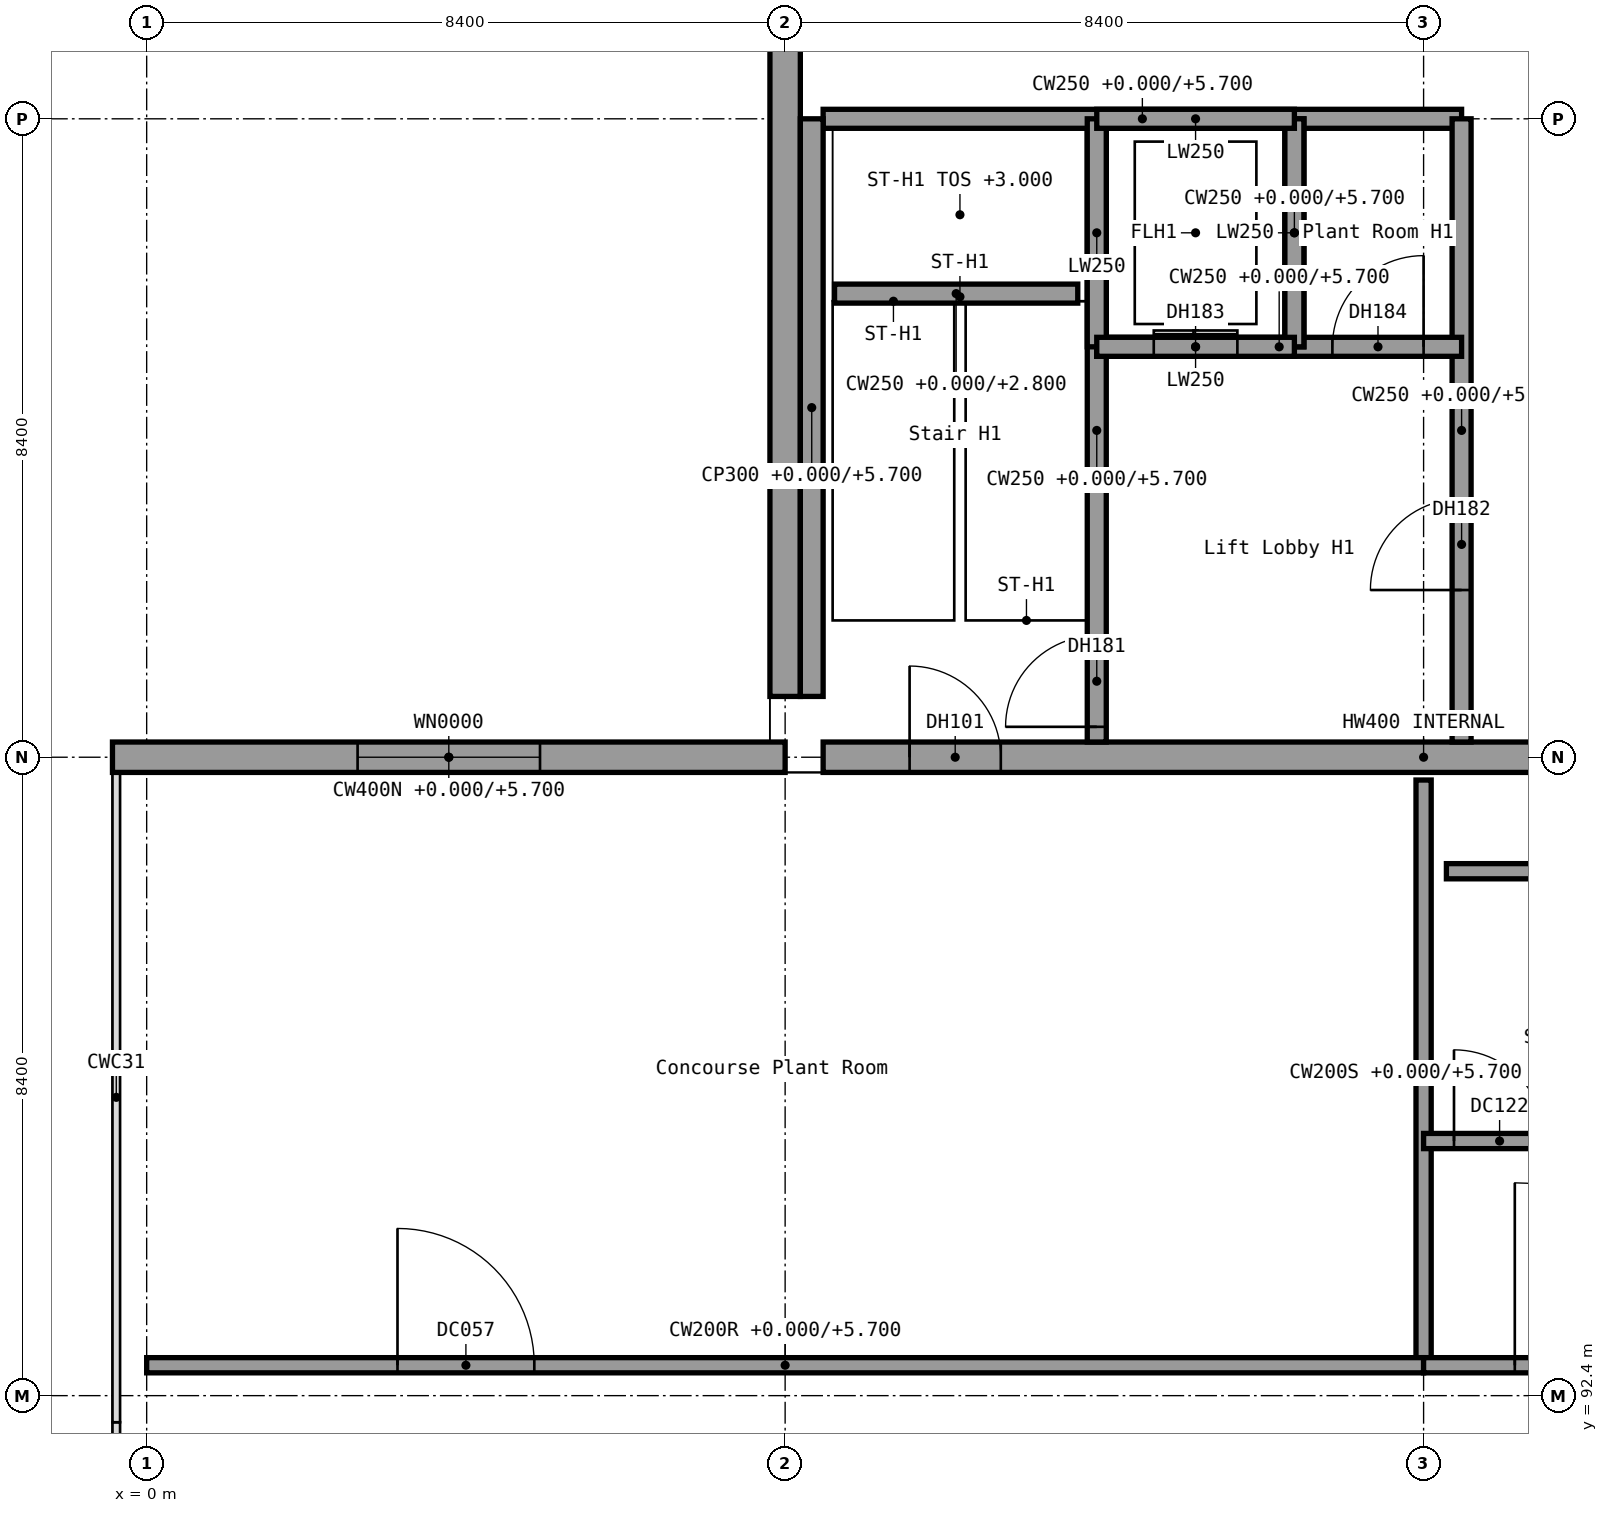
"""IFC4 building model, lengths in metres.
Left out: names, types, materials, properties, quantities, classifications, styles, units other than length and angle.
Written with IfcOpenShell. Run it as: python <this file> out.ifc"""

import sys

from ifc_helpers import new_model, si_unit, direction, frame, frame_2d, origin, origin_2d, place, context, subcontext, project, spatial, rectangle, extrude, element, fill, save


model = new_model("IFC4")
c1 = context("Model", 3, precision=1e-05, world=origin(), true_north=direction((0.0, 1.0)))
c2 = subcontext(c1, "Body", "Model", "MODEL_VIEW")
j1 = project(units=[si_unit("LENGTHUNIT", "METRE"), si_unit("PLANEANGLEUNIT", "RADIAN")], contexts=[c1])
p1 = place(None, origin())
s1 = spatial("IfcSite", under=j1, at=p1, CompositionType="ELEMENT")
p2 = place(p1, origin())
s2 = spatial("IfcBuilding", under=s1, at=p2, CompositionType="ELEMENT")
p3 = place(p2, origin())
s3 = spatial("IfcBuildingStorey", under=s2, at=p3, CompositionType="ELEMENT", Elevation=0.0)
p4 = place(p3, frame((8.4, 100.8, 0.0), z_axis=(0.0, 0.0, 1.0), x_axis=(1.0, 0.0, 0.0)))
e1 = element("IfcColumn", 1, at=p4, inside=s3, PredefinedType="COLUMN", context=c2, shape_type="SweptSolid", body=[
    extrude(rectangle(XDim=1.0, YDim=1.6, at=origin_2d()), origin(), (0.0, 0.0, 1.0), 6.0),
])
p5 = place(p3, frame((8.9, 100.8, 0.0), z_axis=(0.0, 0.0, 1.0), x_axis=(1.0, 0.0, 0.0)))
e2 = element("IfcWall", 2, at=p5, inside=s3, PredefinedType="STANDARD", context=c2, shape_type="SweptSolid", body=[
    extrude(rectangle(XDim=15.8, YDim=0.4, at=frame_2d((7.9, 0.0))), origin(), (0.0, 0.0, 1.0), 4.5),
])
p6 = place(p5, frame((1.137, 0.0, 0.0)))
e3 = element("IfcOpeningElement", 3, at=p6, cuts=e2, PredefinedType="OPENING", context=c2, shape_type="SweptSolid", body=[
    extrude(rectangle(XDim=1.2, YDim=2.1, at=frame_2d((0.6, 1.05))), frame((0.0, 0.2, 0.0), z_axis=(0.0, -1.0, 0.0), x_axis=(1.0, 0.0, 0.0)), (0.0, 0.0, 1.0), 0.4),
])
p7 = place(p3, frame((8.4, 101.6, 0.0), z_axis=(0.0, 0.0, 1.0), x_axis=(0.0, 1.0, 0.0)))
e4 = element("IfcWall", 4, at=p7, inside=s3, PredefinedType="SHEAR", context=c2, shape_type="SweptSolid", body=[
    extrude(rectangle(XDim=99.2, YDim=0.4, at=frame_2d((49.6, 0.0))), origin(), (0.0, 0.0, 1.0), 6.0),
])
p8 = place(p7, frame((18.3, 0.0, 1.0)))
e5 = element("IfcOpeningElement", 5, at=p8, cuts=e4, PredefinedType="OPENING", context=c2, shape_type="SweptSolid", body=[
    extrude(rectangle(XDim=4.2, YDim=2.4, at=frame_2d((2.1, 1.2))), frame((0.0, 0.2, 0.0), z_axis=(0.0, -1.0, 0.0), x_axis=(1.0, 0.0, 0.0)), (0.0, 0.0, 1.0), 0.4),
])
p9 = place(p7, frame((38.3, 0.0, 1.0)))
e6 = element("IfcOpeningElement", 6, at=p9, cuts=e4, PredefinedType="OPENING", context=c2, shape_type="SweptSolid", body=[
    extrude(rectangle(XDim=4.2, YDim=2.4, at=frame_2d((2.1, 1.2))), frame((0.0, 0.2, 0.0), z_axis=(0.0, -1.0, 0.0), x_axis=(1.0, 0.0, 0.0)), (0.0, 0.0, 1.0), 0.4),
])
p10 = place(p7, frame((56.3, 0.0, 1.0)))
e7 = element("IfcOpeningElement", 7, at=p10, cuts=e4, PredefinedType="OPENING", context=c2, shape_type="SweptSolid", body=[
    extrude(rectangle(XDim=4.2, YDim=2.4, at=frame_2d((2.1, 1.2))), frame((0.0, 0.2, 0.0), z_axis=(0.0, -1.0, 0.0), x_axis=(1.0, 0.0, 0.0)), (0.0, 0.0, 1.0), 0.4),
])
p11 = place(p7, frame((76.3, 0.0, 1.0)))
e8 = element("IfcOpeningElement", 8, at=p11, cuts=e4, PredefinedType="OPENING", context=c2, shape_type="SweptSolid", body=[
    extrude(rectangle(XDim=4.2, YDim=2.4, at=frame_2d((2.1, 1.2))), frame((0.0, 0.2, 0.0), z_axis=(0.0, -1.0, 0.0), x_axis=(1.0, 0.0, 0.0)), (0.0, 0.0, 1.0), 0.4),
])
p12 = place(p3, frame((12.5, 101.0, 0.0), z_axis=(0.0, 0.0, 1.0), x_axis=(0.0, 1.0, 0.0)))
e9 = element("IfcWall", 9, at=p12, inside=s3, PredefinedType="SHEAR", context=c2, shape_type="SweptSolid", body=[
    extrude(rectangle(XDim=8.2, YDim=0.25, at=frame_2d((4.1, 0.0))), origin(), (0.0, 0.0, 1.0), 5.7),
])
p13 = place(p12, frame((0.2, 0.0, 0.0)))
e10 = element("IfcOpeningElement", 10, at=p13, cuts=e9, PredefinedType="OPENING", context=c2, shape_type="SweptSolid", body=[
    extrude(rectangle(XDim=1.2, YDim=2.1, at=frame_2d((0.6, 1.05))), frame((0.0, 0.125, 0.0), z_axis=(0.0, -1.0, 0.0), x_axis=(1.0, 0.0, 0.0)), (0.0, 0.0, 1.0), 0.25),
])
p14 = place(p3, frame((8.9, 109.2, 0.0), z_axis=(0.0, 0.0, 1.0), x_axis=(1.0, 0.0, 0.0)))
e11 = element("IfcWall", 11, at=p14, inside=s3, PredefinedType="SHEAR", context=c2, shape_type="SweptSolid", body=[
    extrude(rectangle(XDim=8.4, YDim=0.25, at=frame_2d((4.2, 0.0))), origin(), (0.0, 0.0, 1.0), 5.7),
])
p15 = place(p3, frame((17.3, 101.0, 0.0), z_axis=(0.0, 0.0, 1.0), x_axis=(0.0, 1.0, 0.0)))
e12 = element("IfcWall", 12, at=p15, inside=s3, PredefinedType="SHEAR", context=c2, shape_type="SweptSolid", body=[
    extrude(rectangle(XDim=8.2, YDim=0.25, at=frame_2d((4.1, 0.0))), origin(), (0.0, 0.0, 1.0), 5.7),
])
p16 = place(p15, frame((2.0, 0.0, 0.0)))
e13 = element("IfcOpeningElement", 13, at=p16, cuts=e12, PredefinedType="OPENING", context=c2, shape_type="SweptSolid", body=[
    extrude(rectangle(XDim=1.2, YDim=2.1, at=frame_2d((0.6, 1.05))), frame((0.0, 0.125, 0.0), z_axis=(0.0, -1.0, 0.0), x_axis=(1.0, 0.0, 0.0)), (0.0, 0.0, 1.0), 0.25),
])
p17 = place(p3, frame((12.5, 106.2, 0.0), z_axis=(0.0, 0.0, 1.0), x_axis=(1.0, 0.0, 0.0)))
e14 = element("IfcWall", 14, at=p17, inside=s3, PredefinedType="SHEAR", context=c2, shape_type="SweptSolid", body=[
    extrude(rectangle(XDim=4.8, YDim=0.25, at=frame_2d((2.4, 0.0))), origin(), (0.0, 0.0, 1.0), 5.7),
])
p18 = place(p17, frame((0.75, 0.0, 0.0)))
e15 = element("IfcOpeningElement", 15, at=p18, cuts=e14, PredefinedType="OPENING", context=c2, shape_type="SweptSolid", body=[
    extrude(rectangle(XDim=1.1, YDim=2.1, at=frame_2d((0.55, 1.05))), frame((0.0, 0.125, 0.0), z_axis=(0.0, -1.0, 0.0), x_axis=(1.0, 0.0, 0.0)), (0.0, 0.0, 1.0), 0.25),
])
p19 = place(p17, frame((3.1, 0.0, 0.0)))
e16 = element("IfcOpeningElement", 16, at=p19, cuts=e14, PredefinedType="OPENING", context=c2, shape_type="SweptSolid", body=[
    extrude(rectangle(XDim=1.2, YDim=2.1, at=frame_2d((0.6, 1.05))), frame((0.0, 0.125, 0.0), z_axis=(0.0, -1.0, 0.0), x_axis=(1.0, 0.0, 0.0)), (0.0, 0.0, 1.0), 0.25),
])
p20 = place(p3, frame((15.1, 106.2, 0.0), z_axis=(0.0, 0.0, 1.0), x_axis=(0.0, 1.0, 0.0)))
e17 = element("IfcWall", 17, at=p20, inside=s3, PredefinedType="SHEAR", context=c2, shape_type="SweptSolid", body=[
    extrude(rectangle(XDim=3.0, YDim=0.25, at=frame_2d((1.5, 0.0))), origin(), (0.0, 0.0, 1.0), 5.7),
])
p21 = place(p3, frame((8.75, 101.6, 0.0), z_axis=(0.0, 0.0, 1.0), x_axis=(0.0, 1.0, 0.0)))
e18 = element("IfcWall", 18, at=p21, inside=s3, PredefinedType="SHEAR", context=c2, shape_type="SweptSolid", body=[
    extrude(rectangle(XDim=7.6, YDim=0.3, at=frame_2d((3.8, 0.0))), origin(), (0.0, 0.0, 1.0), 5.7),
])
p22 = place(p3, frame((9.05, 106.9, 0.0), z_axis=(0.0, 0.0, 1.0), x_axis=(1.0, 0.0, 0.0)))
e19 = element("IfcWall", 19, at=p22, inside=s3, PredefinedType="SHEAR", context=c2, shape_type="SweptSolid", body=[
    extrude(rectangle(XDim=3.2, YDim=0.25, at=frame_2d((1.6, 0.0))), origin(), (0.0, 0.0, 1.0), 2.8),
])
for number, where, z_axis, x_axis in (
    (20, (12.5, 106.2, -1.4), (0.0, 0.0, 1.0), (0.0, 1.0, 0.0)),
    (21, (15.1, 106.2, -1.4), (0.0, 0.0, 1.0), (0.0, 1.0, 0.0)),
):
    element("IfcWall", number, at=place(p3, frame(where, z_axis=z_axis, x_axis=x_axis)), inside=s3, PredefinedType="SHEAR", context=c2, shape_type="SweptSolid", body=[
        extrude(rectangle(XDim=3.0, YDim=0.25, at=frame_2d((1.5, 0.0))), origin(), (0.0, 0.0, 1.0), 1.4),
    ])
for number, where, z_axis, x_axis in (
    (22, (12.5, 106.2, -1.4), (0.0, 0.0, 1.0), (1.0, 0.0, 0.0)),
    (23, (12.5, 109.2, -1.4), (0.0, 0.0, 1.0), (1.0, 0.0, 0.0)),
):
    element("IfcWall", number, at=place(p3, frame(where, z_axis=z_axis, x_axis=x_axis)), inside=s3, PredefinedType="SHEAR", context=c2, shape_type="SweptSolid", body=[
        extrude(rectangle(XDim=2.6, YDim=0.25, at=frame_2d((1.3, 0.0))), origin(), (0.0, 0.0, 1.0), 1.4),
    ])
p23 = place(p3, frame((0.0, 92.4, 0.0), z_axis=(0.0, 0.0, 1.0), x_axis=(1.0, 0.0, 0.0)))
e24 = element("IfcColumn", 24, at=p23, inside=s3, PredefinedType="COLUMN", context=c2, shape_type="SweptSolid", body=[
    extrude(rectangle(XDim=0.7, YDim=0.7, at=origin_2d()), origin(), (0.0, 0.0, 1.0), 6.0),
])
for number, where, z_axis, x_axis in (
    (25, (8.4, 92.4, 0.0), (0.0, 0.0, 1.0), (1.0, 0.0, 0.0)),
    (26, (16.8, 92.4, 0.0), (0.0, 0.0, 1.0), (1.0, 0.0, 0.0)),
):
    element("IfcColumn", number, at=place(p3, frame(where, z_axis=z_axis, x_axis=x_axis)), inside=s3, PredefinedType="COLUMN", context=c2, shape_type="SweptSolid", body=[
        extrude(rectangle(XDim=0.6, YDim=0.6, at=origin_2d()), origin(), (0.0, 0.0, 1.0), 6.0),
    ])
p24 = place(p3, frame((0.0, 99.6, 0.0), z_axis=(0.0, 0.0, 1.0), x_axis=(1.0, 0.0, 0.0)))
e27 = element("IfcColumn", 27, at=p24, inside=s3, PredefinedType="COLUMN", context=c2, shape_type="SweptSolid", body=[
    extrude(rectangle(XDim=0.7, YDim=0.7, at=origin_2d()), origin(), (0.0, 0.0, 1.0), 6.0),
])
for number, where, z_axis, x_axis in (
    (28, (8.4, 99.6, 0.0), (0.0, 0.0, 1.0), (1.0, 0.0, 0.0)),
    (29, (16.8, 99.6, 0.0), (0.0, 0.0, 1.0), (1.0, 0.0, 0.0)),
):
    element("IfcColumn", number, at=place(p3, frame(where, z_axis=z_axis, x_axis=x_axis)), inside=s3, PredefinedType="COLUMN", context=c2, shape_type="SweptSolid", body=[
        extrude(rectangle(XDim=0.6, YDim=0.6, at=origin_2d()), origin(), (0.0, 0.0, 1.0), 6.0),
    ])
p25 = place(p3, frame((16.8, 100.5, 0.0), z_axis=(0.0, 0.0, 1.0), x_axis=(0.0, -1.0, 0.0)))
e30 = element("IfcWall", 30, at=p25, inside=s3, PredefinedType="SOLIDWALL", context=c2, shape_type="SweptSolid", body=[
    extrude(rectangle(XDim=7.7, YDim=0.2, at=frame_2d((3.85, 0.0))), origin(), (0.0, 0.0, 1.0), 5.7),
])
p26 = place(p3, frame((17.1, 99.3, 0.0), z_axis=(0.0, 0.0, 1.0), x_axis=(1.0, 0.0, 0.0)))
e31 = element("IfcWall", 31, at=p26, inside=s3, PredefinedType="SOLIDWALL", context=c2, shape_type="SweptSolid", body=[
    extrude(rectangle(XDim=7.8, YDim=0.2, at=frame_2d((3.9, 0.0))), origin(), (0.0, 0.0, 1.0), 5.1),
])
p27 = place(p3, frame((-0.45, 100.8, 0.0), z_axis=(0.0, 0.0, 1.0), x_axis=(1.0, 0.0, 0.0)))
e32 = element("IfcWall", 32, at=p27, inside=s3, PredefinedType="SOLIDWALL", context=c2, shape_type="SweptSolid", body=[
    extrude(rectangle(XDim=8.85, YDim=0.4, at=frame_2d((4.425, 0.0))), origin(), (0.0, 0.0, 1.0), 5.7),
])
p28 = place(p27, frame((3.225, 0.0, 1.0)))
e33 = element("IfcOpeningElement", 33, at=p28, cuts=e32, PredefinedType="OPENING", context=c2, shape_type="SweptSolid", body=[
    extrude(rectangle(XDim=2.4, YDim=2.4, at=frame_2d((1.2, 1.2))), frame((0.0, 0.2, 0.0), z_axis=(0.0, -1.0, 0.0), x_axis=(1.0, 0.0, 0.0)), (0.0, 0.0, 1.0), 0.4),
])
p29 = place(p3, frame((0.0, 92.8, 0.0), z_axis=(0.0, 0.0, 1.0), x_axis=(1.0, 0.0, 0.0)))
e34 = element("IfcWall", 34, at=p29, inside=s3, PredefinedType="PARTITIONING", context=c2, shape_type="SweptSolid", body=[
    extrude(rectangle(XDim=16.8, YDim=0.2, at=frame_2d((8.4, 0.0))), origin(), (0.0, 0.0, 1.0), 5.7),
])
p30 = place(p29, frame((3.3, 0.0, 0.0)))
e35 = element("IfcOpeningElement", 35, at=p30, cuts=e34, PredefinedType="OPENING", context=c2, shape_type="SweptSolid", body=[
    extrude(rectangle(XDim=1.8, YDim=2.4, at=frame_2d((0.9, 1.2))), frame((0.0, 0.1, 0.0), z_axis=(0.0, -1.0, 0.0), x_axis=(1.0, 0.0, 0.0)), (0.0, 0.0, 1.0), 0.2),
])
p31 = place(p3, frame((16.8, 92.8, 0.0), z_axis=(0.0, 0.0, 1.0), x_axis=(1.0, 0.0, 0.0)))
e36 = element("IfcWall", 36, at=p31, inside=s3, PredefinedType="SOLIDWALL", context=c2, shape_type="SweptSolid", body=[
    extrude(rectangle(XDim=8.4, YDim=0.2, at=frame_2d((4.2, 0.0))), origin(), (0.0, 0.0, 1.0), 5.7),
])
p32 = place(p31, frame((1.2, 0.0, 0.0)))
e37 = element("IfcOpeningElement", 37, at=p32, cuts=e36, PredefinedType="OPENING", context=c2, shape_type="SweptSolid", body=[
    extrude(rectangle(XDim=2.4, YDim=2.4, at=frame_2d((1.2, 1.2))), frame((0.0, 0.1, 0.0), z_axis=(0.0, -1.0, 0.0), x_axis=(1.0, 0.0, 0.0)), (0.0, 0.0, 1.0), 0.2),
])
p33 = place(p3, frame((16.8, 95.75, 0.0), z_axis=(0.0, 0.0, 1.0), x_axis=(1.0, 0.0, 0.0)))
e38 = element("IfcWall", 38, at=p33, inside=s3, PredefinedType="SOLIDWALL", context=c2, shape_type="SweptSolid", body=[
    extrude(rectangle(XDim=8.4, YDim=0.2, at=frame_2d((4.2, 0.0))), origin(), (0.0, 0.0, 1.0), 5.7),
])
p34 = place(p33, frame((0.4, 0.0, 0.0)))
e39 = element("IfcOpeningElement", 39, at=p34, cuts=e38, PredefinedType="OPENING", context=c2, shape_type="SweptSolid", body=[
    extrude(rectangle(XDim=1.2, YDim=2.4, at=frame_2d((0.6, 1.2))), frame((0.0, 0.1, 0.0), z_axis=(0.0, -1.0, 0.0), x_axis=(1.0, 0.0, 0.0)), (0.0, 0.0, 1.0), 0.2),
])
p35 = place(p6, origin())
e40 = element("IfcDoor", 40, at=p35, inside=s3, OperationType="SINGLE_SWING_LEFT", PredefinedType="DOOR", context=c2, shape_type="SweptSolid", body=[
    extrude(rectangle(XDim=1.2, YDim=2.1, at=frame_2d((0.6, 1.05))), frame((0.0, 0.025, 0.0), z_axis=(0.0, -1.0, 0.0), x_axis=(1.0, 0.0, 0.0)), (0.0, 0.0, 1.0), 0.05),
])
fill(e3, e40)
p36 = place(p13, origin())
e41 = element("IfcDoor", 41, at=p36, inside=s3, OperationType="SINGLE_SWING_LEFT", PredefinedType="DOOR", context=c2, shape_type="SweptSolid", body=[
    extrude(rectangle(XDim=1.2, YDim=2.1, at=frame_2d((0.6, 1.05))), frame((0.0, 0.025, 0.0), z_axis=(0.0, -1.0, 0.0), x_axis=(1.0, 0.0, 0.0)), (0.0, 0.0, 1.0), 0.05),
])
fill(e10, e41)
p37 = place(p16, origin())
e42 = element("IfcDoor", 42, at=p37, inside=s3, OperationType="SINGLE_SWING_LEFT", PredefinedType="DOOR", context=c2, shape_type="SweptSolid", body=[
    extrude(rectangle(XDim=1.2, YDim=2.1, at=frame_2d((0.6, 1.05))), frame((0.0, 0.025, 0.0), z_axis=(0.0, -1.0, 0.0), x_axis=(1.0, 0.0, 0.0)), (0.0, 0.0, 1.0), 0.05),
])
fill(e13, e42)
p38 = place(p18, origin())
e43 = element("IfcDoor", 43, at=p38, inside=s3, OperationType="DOUBLE_DOOR_SLIDING", PredefinedType="DOOR", context=c2, shape_type="SweptSolid", body=[
    extrude(rectangle(XDim=1.1, YDim=2.1, at=frame_2d((0.55, 1.05))), frame((0.0, 0.025, 0.0), z_axis=(0.0, -1.0, 0.0), x_axis=(1.0, 0.0, 0.0)), (0.0, 0.0, 1.0), 0.05),
])
fill(e15, e43)
p39 = place(p19, origin())
e44 = element("IfcDoor", 44, at=p39, inside=s3, OperationType="SINGLE_SWING_RIGHT", PredefinedType="DOOR", context=c2, shape_type="SweptSolid", body=[
    extrude(rectangle(XDim=1.2, YDim=2.1, at=frame_2d((0.6, 1.05))), frame((0.0, 0.025, 0.0), z_axis=(0.0, -1.0, 0.0), x_axis=(1.0, 0.0, 0.0)), (0.0, 0.0, 1.0), 0.05),
])
fill(e16, e44)
p40 = place(p28, origin())
e45 = element("IfcWindow", 45, at=p40, inside=s3, PartitioningType="SINGLE_PANEL", PredefinedType="WINDOW", context=c2, shape_type="SweptSolid", body=[
    extrude(rectangle(XDim=2.4, YDim=2.4, at=frame_2d((1.2, 1.2))), frame((0.0, 0.03, 0.0), z_axis=(0.0, -1.0, 0.0), x_axis=(1.0, 0.0, 0.0)), (0.0, 0.0, 1.0), 0.06),
])
fill(e33, e45)
p41 = place(p30, origin())
e46 = element("IfcDoor", 46, at=p41, inside=s3, OperationType="DOUBLE_DOOR_DOUBLE_SWING", PredefinedType="DOOR", context=c2, shape_type="SweptSolid", body=[
    extrude(rectangle(XDim=1.8, YDim=2.4, at=frame_2d((0.9, 1.2))), frame((0.0, 0.025, 0.0), z_axis=(0.0, -1.0, 0.0), x_axis=(1.0, 0.0, 0.0)), (0.0, 0.0, 1.0), 0.05),
])
fill(e35, e46)
p42 = place(p32, origin())
e47 = element("IfcDoor", 47, at=p42, inside=s3, OperationType="DOUBLE_DOOR_DOUBLE_SWING", PredefinedType="DOOR", context=c2, shape_type="SweptSolid", body=[
    extrude(rectangle(XDim=2.4, YDim=2.4, at=frame_2d((1.2, 1.2))), frame((0.0, 0.025, 0.0), z_axis=(0.0, -1.0, 0.0), x_axis=(1.0, 0.0, 0.0)), (0.0, 0.0, 1.0), 0.05),
])
fill(e37, e47)
p43 = place(p34, origin())
e48 = element("IfcDoor", 48, at=p43, inside=s3, OperationType="SINGLE_SWING_LEFT", PredefinedType="DOOR", context=c2, shape_type="SweptSolid", body=[
    extrude(rectangle(XDim=1.2, YDim=2.4, at=frame_2d((0.6, 1.2))), frame((0.0, 0.025, 0.0), z_axis=(0.0, -1.0, 0.0), x_axis=(1.0, 0.0, 0.0)), (0.0, 0.0, 1.0), 0.05),
])
fill(e39, e48)
save(model, sys.argv[1])
